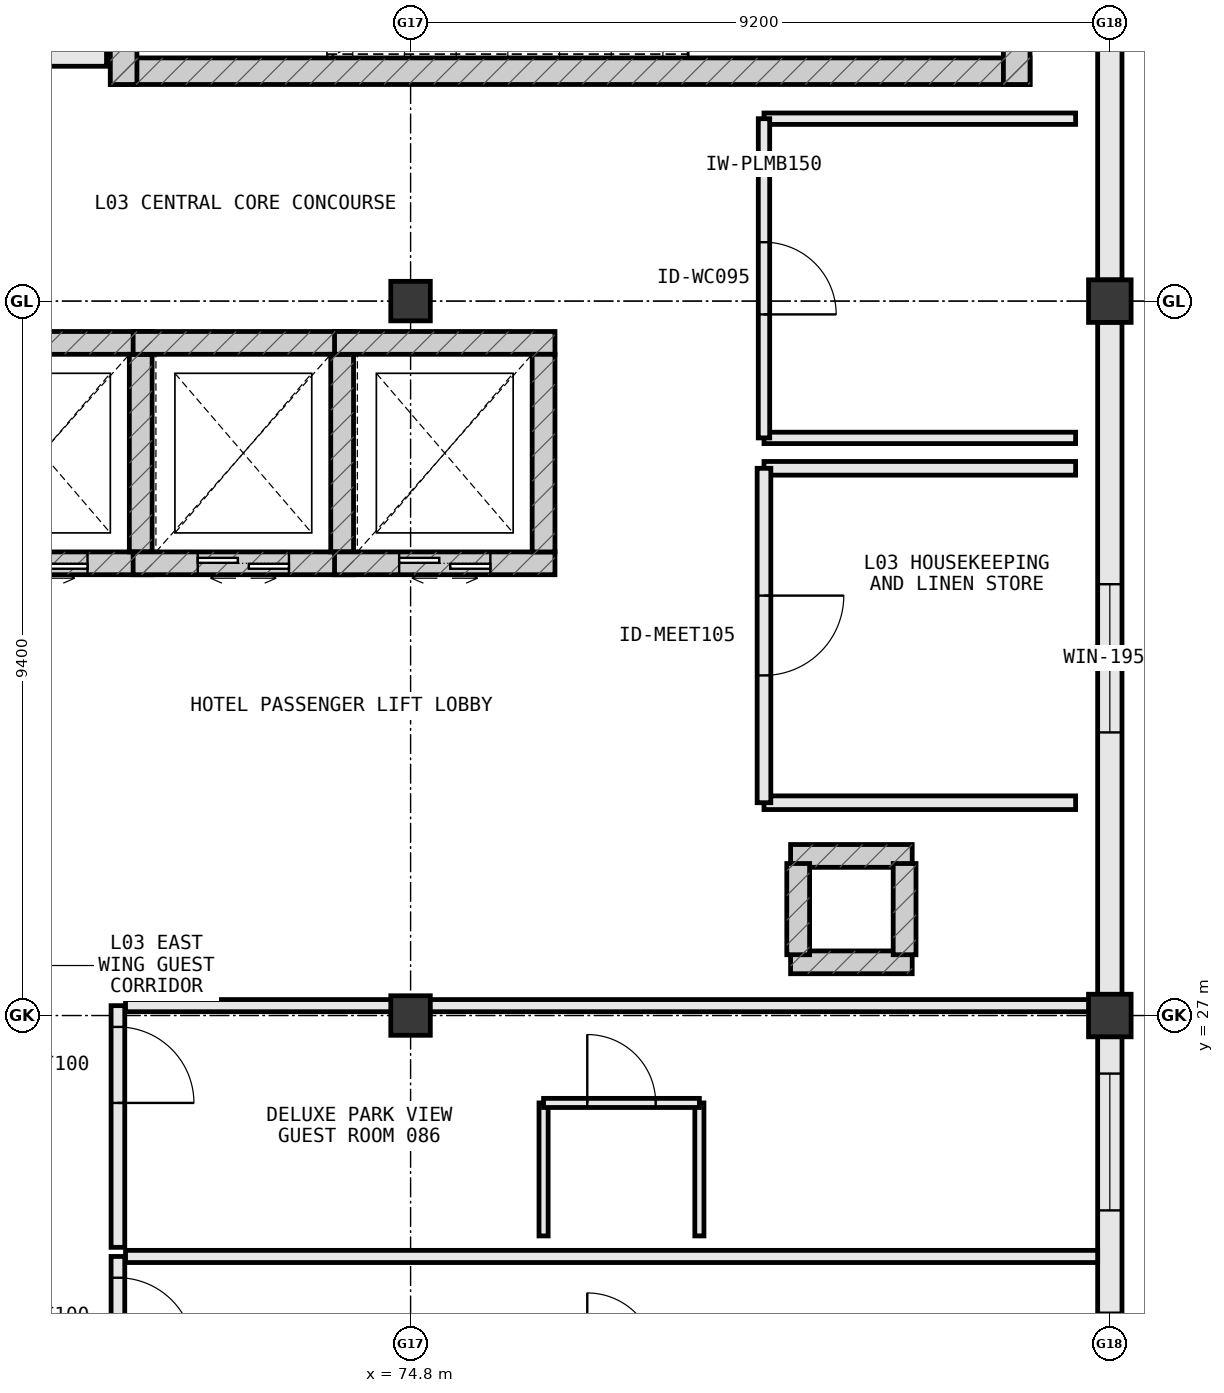
"""IFC4 building model, lengths in metres.
Left out: names, types, materials, properties, quantities, classifications, styles, units other than length and angle.
Written with IfcOpenShell. Run it as: python <this file> out.ifc"""

import sys

from ifc_helpers import new_model, si_unit, direction, frame, frame_2d, origin, origin_2d, place, context, subcontext, project, spatial, rectangle, extrude, element, fill, save


model = new_model("IFC4")
c1 = context("Model", 3, precision=1e-05, world=origin(), true_north=direction((0.0, 1.0)))
c2 = subcontext(c1, "Body", "Model", "MODEL_VIEW")
j1 = project(units=[si_unit("LENGTHUNIT", "METRE"), si_unit("PLANEANGLEUNIT", "RADIAN")], contexts=[c1])
p1 = place(None, origin())
s1 = spatial("IfcSite", under=j1, at=p1, CompositionType="ELEMENT")
p2 = place(p1, origin())
s2 = spatial("IfcBuilding", under=s1, at=p2, CompositionType="ELEMENT")
p3 = place(p2, frame((0.0, 0.0, 16.2)))
s3 = spatial("IfcBuildingStorey", under=s2, at=p3, CompositionType="ELEMENT", Elevation=16.2)
for number, where, z_axis, x_axis in (
    (1, (74.8, 27.0, 0.0), (0.0, 0.0, 1.0), (1.0, 0.0, 0.0)),
    (2, (74.8, 36.4, 0.0), (0.0, 0.0, 1.0), (1.0, 0.0, 0.0)),
):
    element("IfcColumn", number, at=place(p3, frame(where, z_axis=z_axis, x_axis=x_axis)), inside=s3, PredefinedType="COLUMN", context=c2, shape_type="SweptSolid", body=[
        extrude(rectangle(XDim=0.52, YDim=0.52, at=origin_2d()), origin(), (0.0, 0.0, 1.0), 3.8),
    ])
for number, where, z_axis, x_axis in (
    (3, (84.0, 27.0, 0.0), (0.0, 0.0, 1.0), (1.0, 0.0, 0.0)),
    (4, (84.0, 36.4, 0.0), (0.0, 0.0, 1.0), (1.0, 0.0, 0.0)),
):
    element("IfcColumn", number, at=place(p3, frame(where, z_axis=z_axis, x_axis=x_axis)), inside=s3, PredefinedType="COLUMN", context=c2, shape_type="SweptSolid", body=[
        extrude(rectangle(XDim=0.56, YDim=0.56, at=origin_2d()), origin(), (0.0, 0.0, 1.0), 3.8),
    ])
for number, where, z_axis, x_axis in (
    (5, (79.8, 27.7, 0.0), (0.0, 0.0, 1.0), (1.0, 0.0, 0.0)),
    (6, (81.4, 29.1, 0.0), (0.0, 0.0, 1.0), (-1.0, 0.0, 0.0)),
):
    element("IfcWall", number, at=place(p3, frame(where, z_axis=z_axis, x_axis=x_axis)), inside=s3, PredefinedType="SHEAR", context=c2, shape_type="SweptSolid", body=[
        extrude(rectangle(XDim=1.6, YDim=0.3, at=frame_2d((0.8, 0.0))), origin(), (0.0, 0.0, 1.0), 3.56),
    ])
for number, where, z_axis, x_axis in (
    (7, (79.9, 29.0, 0.0), (0.0, 0.0, 1.0), (0.0, -1.0, 0.0)),
    (8, (81.3, 27.8, 0.0), (0.0, 0.0, 1.0), (0.0, 1.0, 0.0)),
):
    element("IfcWall", number, at=place(p3, frame(where, z_axis=z_axis, x_axis=x_axis)), inside=s3, PredefinedType="SHEAR", context=c2, shape_type="SweptSolid", body=[
        extrude(rectangle(XDim=1.2, YDim=0.3, at=frame_2d((0.6, 0.0))), origin(), (0.0, 0.0, 1.0), 3.56),
    ])
p4 = place(p3, frame((84.0, 18.878, 0.0), z_axis=(0.0, 0.0, 1.0), x_axis=(0.0, 1.0, 0.0)))
e9 = element("IfcWall", 9, at=p4, inside=s3, PredefinedType="STANDARD", context=c2, shape_type="SweptSolid", body=[
    extrude(rectangle(XDim=7.844, YDim=0.32, at=frame_2d((3.922, 0.0))), origin(), (0.0, 0.0, 1.0), 2.975),
])
p5 = place(p4, frame((0.176, 0.0, 0.85)))
e10 = element("IfcOpeningElement", 10, at=p5, cuts=e9, PredefinedType="OPENING", context=c2, shape_type="SweptSolid", body=[
    extrude(rectangle(XDim=1.2, YDim=1.55, at=frame_2d((0.6, 0.775))), frame((0.0, 0.172, 0.0), z_axis=(0.0, -1.0, 0.0), x_axis=(1.0, 0.0, 0.0)), (0.0, 0.0, 1.0), 0.344),
])
p6 = place(p4, frame((2.412, 0.0, 0.85)))
e11 = element("IfcOpeningElement", 11, at=p6, cuts=e9, PredefinedType="OPENING", context=c2, shape_type="SweptSolid", body=[
    extrude(rectangle(XDim=1.8, YDim=1.85, at=frame_2d((0.9, 0.925))), frame((0.0, 0.172, 0.0), z_axis=(0.0, -1.0, 0.0), x_axis=(1.0, 0.0, 0.0)), (0.0, 0.0, 1.0), 0.344),
])
p7 = place(p4, frame((5.558, 0.0, 0.85)))
e12 = element("IfcOpeningElement", 12, at=p7, cuts=e9, PredefinedType="OPENING", context=c2, shape_type="SweptSolid", body=[
    extrude(rectangle(XDim=1.8, YDim=1.85, at=frame_2d((0.9, 0.925))), frame((0.0, 0.172, 0.0), z_axis=(0.0, -1.0, 0.0), x_axis=(1.0, 0.0, 0.0)), (0.0, 0.0, 1.0), 0.344),
])
p8 = place(p3, frame((84.0, 27.278, 0.0), z_axis=(0.0, 0.0, 1.0), x_axis=(0.0, 1.0, 0.0)))
e13 = element("IfcWall", 13, at=p8, inside=s3, PredefinedType="STANDARD", context=c2, shape_type="SweptSolid", body=[
    extrude(rectangle(XDim=8.844, YDim=0.32, at=frame_2d((4.422, 0.0))), origin(), (0.0, 0.0, 1.0), 2.975),
])
p9 = place(p8, frame((3.447, 0.0, 0.85)))
e14 = element("IfcOpeningElement", 14, at=p9, cuts=e13, PredefinedType="OPENING", context=c2, shape_type="SweptSolid", body=[
    extrude(rectangle(XDim=1.95, YDim=1.9, at=frame_2d((0.975, 0.95))), frame((0.0, 0.172, 0.0), z_axis=(0.0, -1.0, 0.0), x_axis=(1.0, 0.0, 0.0)), (0.0, 0.0, 1.0), 0.344),
])
p10 = place(p3, frame((84.0, 36.678, 0.0), z_axis=(0.0, 0.0, 1.0), x_axis=(0.0, 1.0, 0.0)))
e15 = element("IfcWall", 15, at=p10, inside=s3, PredefinedType="STANDARD", context=c2, shape_type="SweptSolid", body=[
    extrude(rectangle(XDim=10.244, YDim=0.32, at=frame_2d((5.122, 0.0))), origin(), (0.0, 0.0, 1.0), 2.975),
])
p11 = place(p10, frame((6.708, 0.0, 0.85)))
e16 = element("IfcOpeningElement", 16, at=p11, cuts=e15, PredefinedType="OPENING", context=c2, shape_type="SweptSolid", body=[
    extrude(rectangle(XDim=1.95, YDim=1.9, at=frame_2d((0.975, 0.95))), frame((0.0, 0.172, 0.0), z_axis=(0.0, -1.0, 0.0), x_axis=(1.0, 0.0, 0.0)), (0.0, 0.0, 1.0), 0.344),
])
p12 = place(p3, frame((70.85, 39.425, 0.0), z_axis=(0.0, 0.0, 1.0), x_axis=(1.0, 0.0, 0.0)))
e17 = element("IfcWall", 17, at=p12, inside=s3, PredefinedType="SHEAR", context=c2, shape_type="SweptSolid", body=[
    extrude(rectangle(XDim=12.1, YDim=0.35, at=frame_2d((6.05, 0.0))), origin(), (0.0, 0.0, 1.0), 3.8),
])
p13 = place(p3, frame((82.775, 39.25, 0.0), z_axis=(0.0, 0.0, 1.0), x_axis=(0.0, 1.0, 0.0)))
e18 = element("IfcWall", 18, at=p13, inside=s3, PredefinedType="SHEAR", context=c2, shape_type="SweptSolid", body=[
    extrude(rectangle(XDim=5.1, YDim=0.35, at=frame_2d((2.55, 0.0))), origin(), (0.0, 0.0, 1.0), 3.8),
])
p14 = place(p3, frame((71.025, 44.35, 0.0), z_axis=(0.0, 0.0, 1.0), x_axis=(0.0, -1.0, 0.0)))
e19 = element("IfcWall", 19, at=p14, inside=s3, PredefinedType="SHEAR", context=c2, shape_type="SweptSolid", body=[
    extrude(rectangle(XDim=5.1, YDim=0.35, at=frame_2d((2.55, 0.0))), origin(), (0.0, 0.0, 1.0), 3.8),
])
p15 = place(p14, frame((2.0, 0.0, 0.0)))
e20 = element("IfcOpeningElement", 20, at=p15, cuts=e19, PredefinedType="OPENING", context=c2, shape_type="SweptSolid", body=[
    extrude(rectangle(XDim=1.1, YDim=2.2, at=frame_2d((0.55, 1.1))), frame((0.0, 0.187, 0.0), z_axis=(0.0, -1.0, 0.0), x_axis=(1.0, 0.0, 0.0)), (0.0, 0.0, 1.0), 0.374),
])
p16 = place(p3, frame((68.5, 32.95, 0.0), z_axis=(0.0, 0.0, 1.0), x_axis=(1.0, 0.0, 0.0)))
e21 = element("IfcWall", 21, at=p16, inside=s3, PredefinedType="SHEAR", context=c2, shape_type="SweptSolid", body=[
    extrude(rectangle(XDim=2.9, YDim=0.3, at=frame_2d((1.45, 0.0))), origin(), (0.0, 0.0, 1.0), 3.8),
])
p17 = place(p16, frame((0.85, 0.0, 0.0)))
e22 = element("IfcOpeningElement", 22, at=p17, cuts=e21, PredefinedType="OPENING", context=c2, shape_type="SweptSolid", body=[
    extrude(rectangle(XDim=1.2, YDim=2.2, at=frame_2d((0.6, 1.1))), frame((0.0, 0.162, 0.0), z_axis=(0.0, -1.0, 0.0), x_axis=(1.0, 0.0, 0.0)), (0.0, 0.0, 1.0), 0.324),
])
p18 = place(p3, frame((71.4, 35.85, 0.0), z_axis=(0.0, 0.0, 1.0), x_axis=(-1.0, 0.0, 0.0)))
e23 = element("IfcWall", 23, at=p18, inside=s3, PredefinedType="SHEAR", context=c2, shape_type="SweptSolid", body=[
    extrude(rectangle(XDim=2.9, YDim=0.3, at=frame_2d((1.45, 0.0))), origin(), (0.0, 0.0, 1.0), 3.8),
])
p19 = place(p3, frame((71.25, 33.1, 0.0), z_axis=(0.0, 0.0, 1.0), x_axis=(0.0, 1.0, 0.0)))
e24 = element("IfcWall", 24, at=p19, inside=s3, PredefinedType="SHEAR", context=c2, shape_type="SweptSolid", body=[
    extrude(rectangle(XDim=2.6, YDim=0.3, at=frame_2d((1.3, 0.0))), origin(), (0.0, 0.0, 1.0), 3.8),
])
p20 = place(p3, frame((71.15, 32.95, 0.0), z_axis=(0.0, 0.0, 1.0), x_axis=(1.0, 0.0, 0.0)))
e25 = element("IfcWall", 25, at=p20, inside=s3, PredefinedType="SHEAR", context=c2, shape_type="SweptSolid", body=[
    extrude(rectangle(XDim=2.9, YDim=0.3, at=frame_2d((1.45, 0.0))), origin(), (0.0, 0.0, 1.0), 3.8),
])
p21 = place(p20, frame((0.85, 0.0, 0.0)))
e26 = element("IfcOpeningElement", 26, at=p21, cuts=e25, PredefinedType="OPENING", context=c2, shape_type="SweptSolid", body=[
    extrude(rectangle(XDim=1.2, YDim=2.2, at=frame_2d((0.6, 1.1))), frame((0.0, 0.162, 0.0), z_axis=(0.0, -1.0, 0.0), x_axis=(1.0, 0.0, 0.0)), (0.0, 0.0, 1.0), 0.324),
])
p22 = place(p3, frame((74.05, 35.85, 0.0), z_axis=(0.0, 0.0, 1.0), x_axis=(-1.0, 0.0, 0.0)))
e27 = element("IfcWall", 27, at=p22, inside=s3, PredefinedType="SHEAR", context=c2, shape_type="SweptSolid", body=[
    extrude(rectangle(XDim=2.9, YDim=0.3, at=frame_2d((1.45, 0.0))), origin(), (0.0, 0.0, 1.0), 3.8),
])
p23 = place(p3, frame((73.9, 33.1, 0.0), z_axis=(0.0, 0.0, 1.0), x_axis=(0.0, 1.0, 0.0)))
e28 = element("IfcWall", 28, at=p23, inside=s3, PredefinedType="SHEAR", context=c2, shape_type="SweptSolid", body=[
    extrude(rectangle(XDim=2.6, YDim=0.3, at=frame_2d((1.3, 0.0))), origin(), (0.0, 0.0, 1.0), 3.8),
])
p24 = place(p3, frame((73.8, 32.95, 0.0), z_axis=(0.0, 0.0, 1.0), x_axis=(1.0, 0.0, 0.0)))
e29 = element("IfcWall", 29, at=p24, inside=s3, PredefinedType="SHEAR", context=c2, shape_type="SweptSolid", body=[
    extrude(rectangle(XDim=2.9, YDim=0.3, at=frame_2d((1.45, 0.0))), origin(), (0.0, 0.0, 1.0), 3.8),
])
p25 = place(p24, frame((0.85, 0.0, 0.0)))
e30 = element("IfcOpeningElement", 30, at=p25, cuts=e29, PredefinedType="OPENING", context=c2, shape_type="SweptSolid", body=[
    extrude(rectangle(XDim=1.2, YDim=2.2, at=frame_2d((0.6, 1.1))), frame((0.0, 0.162, 0.0), z_axis=(0.0, -1.0, 0.0), x_axis=(1.0, 0.0, 0.0)), (0.0, 0.0, 1.0), 0.324),
])
p26 = place(p3, frame((76.7, 35.85, 0.0), z_axis=(0.0, 0.0, 1.0), x_axis=(-1.0, 0.0, 0.0)))
e31 = element("IfcWall", 31, at=p26, inside=s3, PredefinedType="SHEAR", context=c2, shape_type="SweptSolid", body=[
    extrude(rectangle(XDim=2.9, YDim=0.3, at=frame_2d((1.45, 0.0))), origin(), (0.0, 0.0, 1.0), 3.8),
])
p27 = place(p3, frame((76.55, 33.1, 0.0), z_axis=(0.0, 0.0, 1.0), x_axis=(0.0, 1.0, 0.0)))
e32 = element("IfcWall", 32, at=p27, inside=s3, PredefinedType="SHEAR", context=c2, shape_type="SweptSolid", body=[
    extrude(rectangle(XDim=2.6, YDim=0.3, at=frame_2d((1.3, 0.0))), origin(), (0.0, 0.0, 1.0), 3.8),
])
p28 = place(p3, frame((65.4, 39.6, 0.0), z_axis=(0.0, 0.0, 1.0), x_axis=(1.0, 0.0, 0.0)))
e33 = element("IfcWall", 33, at=p28, inside=s3, PredefinedType="STANDARD", context=c2, shape_type="SweptSolid", body=[
    extrude(rectangle(XDim=5.4, YDim=0.22, at=frame_2d((2.7, 0.0))), origin(), (0.0, 0.0, 1.0), 3.56),
])
p29 = place(p28, frame((1.95, 0.0, 0.0)))
e34 = element("IfcOpeningElement", 34, at=p29, cuts=e33, PredefinedType="OPENING", context=c2, shape_type="SweptSolid", body=[
    extrude(rectangle(XDim=1.5, YDim=2.2, at=frame_2d((0.75, 1.1))), frame((0.0, 0.122, 0.0), z_axis=(0.0, -1.0, 0.0), x_axis=(1.0, 0.0, 0.0)), (0.0, 0.0, 1.0), 0.244),
])
for number, where, z_axis, x_axis in (
    (35, (79.45, 29.8, 0.0), (0.0, 0.0, 1.0), (1.0, 0.0, 0.0)),
    (36, (83.55, 34.2, 0.0), (0.0, 0.0, 1.0), (-1.0, 0.0, 0.0)),
):
    element("IfcWall", number, at=place(p3, frame(where, z_axis=z_axis, x_axis=x_axis)), inside=s3, PredefinedType="PARTITIONING", context=c2, shape_type="SweptSolid", body=[
        extrude(rectangle(XDim=4.1, YDim=0.18, at=frame_2d((2.05, 0.0))), origin(), (0.0, 0.0, 1.0), 3.56),
    ])
p30 = place(p3, frame((79.45, 34.2, 0.0), z_axis=(0.0, 0.0, 1.0), x_axis=(0.0, -1.0, 0.0)))
e37 = element("IfcWall", 37, at=p30, inside=s3, PredefinedType="PARTITIONING", context=c2, shape_type="SweptSolid", body=[
    extrude(rectangle(XDim=4.4, YDim=0.18, at=frame_2d((2.2, 0.0))), origin(), (0.0, 0.0, 1.0), 3.56),
])
p31 = place(p30, frame((1.675, 0.0, 0.0)))
e38 = element("IfcOpeningElement", 38, at=p31, cuts=e37, PredefinedType="OPENING", context=c2, shape_type="SweptSolid", body=[
    extrude(rectangle(XDim=1.05, YDim=2.2, at=frame_2d((0.525, 1.1))), frame((0.0, 0.102, 0.0), z_axis=(0.0, -1.0, 0.0), x_axis=(1.0, 0.0, 0.0)), (0.0, 0.0, 1.0), 0.204),
])
for number, where, z_axis, x_axis in (
    (39, (79.45, 34.6, 0.0), (0.0, 0.0, 1.0), (1.0, 0.0, 0.0)),
    (40, (83.55, 38.8, 0.0), (0.0, 0.0, 1.0), (-1.0, 0.0, 0.0)),
):
    element("IfcWall", number, at=place(p3, frame(where, z_axis=z_axis, x_axis=x_axis)), inside=s3, PredefinedType="PLUMBINGWALL", context=c2, shape_type="SweptSolid", body=[
        extrude(rectangle(XDim=4.1, YDim=0.15, at=frame_2d((2.05, 0.0))), origin(), (0.0, 0.0, 1.0), 3.56),
    ])
p32 = place(p3, frame((79.45, 38.8, 0.0), z_axis=(0.0, 0.0, 1.0), x_axis=(0.0, -1.0, 0.0)))
e41 = element("IfcWall", 41, at=p32, inside=s3, PredefinedType="PLUMBINGWALL", context=c2, shape_type="SweptSolid", body=[
    extrude(rectangle(XDim=4.2, YDim=0.15, at=frame_2d((2.1, 0.0))), origin(), (0.0, 0.0, 1.0), 3.56),
])
p33 = place(p32, frame((1.625, 0.0, 0.0)))
e42 = element("IfcOpeningElement", 42, at=p33, cuts=e41, PredefinedType="OPENING", context=c2, shape_type="SweptSolid", body=[
    extrude(rectangle(XDim=0.95, YDim=2.15, at=frame_2d((0.475, 1.075))), frame((0.0, 0.087, 0.0), z_axis=(0.0, -1.0, 0.0), x_axis=(1.0, 0.0, 0.0)), (0.0, 0.0, 1.0), 0.174),
])
p34 = place(p3, frame((70.95, 23.83, 0.0), z_axis=(0.0, 0.0, 1.0), x_axis=(0.0, -1.0, 0.0)))
e43 = element("IfcWall", 43, at=p34, inside=s3, PredefinedType="PARTITIONING", context=c2, shape_type="SweptSolid", body=[
    extrude(rectangle(XDim=3.28, YDim=0.18, at=frame_2d((1.64, 0.0))), origin(), (0.0, 0.0, 1.0), 3.56),
])
p35 = place(p34, frame((0.28, 0.0, 0.0)))
e44 = element("IfcOpeningElement", 44, at=p35, cuts=e43, PredefinedType="OPENING", context=c2, shape_type="SweptSolid", body=[
    extrude(rectangle(XDim=1.0, YDim=2.2, at=frame_2d((0.5, 1.1))), frame((0.0, 0.102, 0.0), z_axis=(0.0, -1.0, 0.0), x_axis=(1.0, 0.0, 0.0)), (0.0, 0.0, 1.0), 0.204),
])
p36 = place(p3, frame((71.05, 23.83, 0.0), z_axis=(0.0, 0.0, 1.0), x_axis=(1.0, 0.0, 0.0)))
e45 = element("IfcWall", 45, at=p36, inside=s3, PredefinedType="PARTITIONING", context=c2, shape_type="SweptSolid", body=[
    extrude(rectangle(XDim=12.79, YDim=0.16, at=frame_2d((6.395, 0.0))), origin(), (0.0, 0.0, 1.0), 3.56),
])
p37 = place(p3, frame((70.95, 27.13, 0.0), z_axis=(0.0, 0.0, 1.0), x_axis=(0.0, -1.0, 0.0)))
e46 = element("IfcWall", 46, at=p37, inside=s3, PredefinedType="PARTITIONING", context=c2, shape_type="SweptSolid", body=[
    extrude(rectangle(XDim=3.18, YDim=0.18, at=frame_2d((1.59, 0.0))), origin(), (0.0, 0.0, 1.0), 3.56),
])
p38 = place(p37, frame((0.28, 0.0, 0.0)))
e47 = element("IfcOpeningElement", 47, at=p38, cuts=e46, PredefinedType="OPENING", context=c2, shape_type="SweptSolid", body=[
    extrude(rectangle(XDim=1.0, YDim=2.2, at=frame_2d((0.5, 1.1))), frame((0.0, 0.102, 0.0), z_axis=(0.0, -1.0, 0.0), x_axis=(1.0, 0.0, 0.0)), (0.0, 0.0, 1.0), 0.204),
])
p39 = place(p3, frame((71.05, 27.13, 0.0), z_axis=(0.0, 0.0, 1.0), x_axis=(1.0, 0.0, 0.0)))
e48 = element("IfcWall", 48, at=p39, inside=s3, PredefinedType="PARTITIONING", context=c2, shape_type="SweptSolid", body=[
    extrude(rectangle(XDim=12.79, YDim=0.16, at=frame_2d((6.395, 0.0))), origin(), (0.0, 0.0, 1.0), 2.915),
])
for number, where, z_axis, x_axis in (
    (49, (76.55, 24.1, 0.0), (0.0, 0.0, 1.0), (0.0, 1.0, 0.0)),
    (50, (78.6, 24.1, 0.0), (0.0, 0.0, 1.0), (0.0, 1.0, 0.0)),
):
    element("IfcWall", number, at=place(p3, frame(where, z_axis=z_axis, x_axis=x_axis)), inside=s3, PredefinedType="PARTITIONING", context=c2, shape_type="SweptSolid", body=[
        extrude(rectangle(XDim=1.75, YDim=0.12, at=frame_2d((0.875, 0.0))), origin(), (0.0, 0.0, 1.0), 3.56),
    ])
p40 = place(p3, frame((76.55, 25.85, 0.0), z_axis=(0.0, 0.0, 1.0), x_axis=(1.0, 0.0, 0.0)))
e51 = element("IfcWall", 51, at=p40, inside=s3, PredefinedType="PARTITIONING", context=c2, shape_type="SweptSolid", body=[
    extrude(rectangle(XDim=2.05, YDim=0.12, at=frame_2d((1.025, 0.0))), origin(), (0.0, 0.0, 1.0), 3.56),
])
p41 = place(p40, frame((0.575, 0.0, 0.0)))
e52 = element("IfcOpeningElement", 52, at=p41, cuts=e51, PredefinedType="OPENING", context=c2, shape_type="SweptSolid", body=[
    extrude(rectangle(XDim=0.9, YDim=2.15, at=frame_2d((0.45, 1.075))), frame((0.0, 0.072, 0.0), z_axis=(0.0, -1.0, 0.0), x_axis=(1.0, 0.0, 0.0)), (0.0, 0.0, 1.0), 0.144),
])
p42 = place(p9, origin())
e53 = element("IfcWindow", 53, at=p42, inside=s3, PartitioningType="DOUBLE_PANEL_VERTICAL", PredefinedType="WINDOW", context=c2, shape_type="SweptSolid", body=[
    extrude(rectangle(XDim=1.95, YDim=1.9, at=frame_2d((0.975, 0.95))), frame((0.0, 0.03, 0.0), z_axis=(0.0, -1.0, 0.0), x_axis=(1.0, 0.0, 0.0)), (0.0, 0.0, 1.0), 0.06),
])
fill(e14, e53)
p43 = place(p7, origin())
e54 = element("IfcWindow", 54, at=p43, inside=s3, PartitioningType="SINGLE_PANEL", PredefinedType="WINDOW", context=c2, shape_type="SweptSolid", body=[
    extrude(rectangle(XDim=1.8, YDim=1.85, at=frame_2d((0.9, 0.925))), frame((0.0, 0.03, 0.0), z_axis=(0.0, -1.0, 0.0), x_axis=(1.0, 0.0, 0.0)), (0.0, 0.0, 1.0), 0.06),
])
fill(e12, e54)
p44 = place(p17, origin())
e55 = element("IfcDoor", 55, at=p44, inside=s3, OperationType="DOUBLE_DOOR_SLIDING", PredefinedType="DOOR", context=c2, shape_type="SweptSolid", body=[
    extrude(rectangle(XDim=1.2, YDim=2.2, at=frame_2d((0.6, 1.1))), frame((0.0, 0.025, 0.0), z_axis=(0.0, -1.0, 0.0), x_axis=(1.0, 0.0, 0.0)), (0.0, 0.0, 1.0), 0.05),
])
fill(e22, e55)
p45 = place(p21, origin())
e56 = element("IfcDoor", 56, at=p45, inside=s3, OperationType="DOUBLE_DOOR_SLIDING", PredefinedType="DOOR", context=c2, shape_type="SweptSolid", body=[
    extrude(rectangle(XDim=1.2, YDim=2.2, at=frame_2d((0.6, 1.1))), frame((0.0, 0.025, 0.0), z_axis=(0.0, -1.0, 0.0), x_axis=(1.0, 0.0, 0.0)), (0.0, 0.0, 1.0), 0.05),
])
fill(e26, e56)
p46 = place(p25, origin())
e57 = element("IfcDoor", 57, at=p46, inside=s3, OperationType="DOUBLE_DOOR_SLIDING", PredefinedType="DOOR", context=c2, shape_type="SweptSolid", body=[
    extrude(rectangle(XDim=1.2, YDim=2.2, at=frame_2d((0.6, 1.1))), frame((0.0, 0.025, 0.0), z_axis=(0.0, -1.0, 0.0), x_axis=(1.0, 0.0, 0.0)), (0.0, 0.0, 1.0), 0.05),
])
fill(e30, e57)
p47 = place(p31, origin())
e58 = element("IfcDoor", 58, at=p47, inside=s3, OperationType="SINGLE_SWING_LEFT", PredefinedType="DOOR", context=c2, shape_type="SweptSolid", body=[
    extrude(rectangle(XDim=1.05, YDim=2.2, at=frame_2d((0.525, 1.1))), frame((0.0, 0.025, 0.0), z_axis=(0.0, -1.0, 0.0), x_axis=(1.0, 0.0, 0.0)), (0.0, 0.0, 1.0), 0.05),
])
fill(e38, e58)
p48 = place(p33, origin())
e59 = element("IfcDoor", 59, at=p48, inside=s3, OperationType="SINGLE_SWING_RIGHT", PredefinedType="DOOR", context=c2, shape_type="SweptSolid", body=[
    extrude(rectangle(XDim=0.95, YDim=2.15, at=frame_2d((0.475, 1.075))), frame((0.0, 0.025, 0.0), z_axis=(0.0, -1.0, 0.0), x_axis=(1.0, 0.0, 0.0)), (0.0, 0.0, 1.0), 0.05),
])
fill(e42, e59)
p49 = place(p35, origin())
e60 = element("IfcDoor", 60, at=p49, inside=s3, OperationType="SINGLE_SWING_RIGHT", PredefinedType="DOOR", context=c2, shape_type="SweptSolid", body=[
    extrude(rectangle(XDim=1.0, YDim=2.2, at=frame_2d((0.5, 1.1))), frame((0.0, 0.025, 0.0), z_axis=(0.0, -1.0, 0.0), x_axis=(1.0, 0.0, 0.0)), (0.0, 0.0, 1.0), 0.05),
])
fill(e44, e60)
p50 = place(p38, origin())
e61 = element("IfcDoor", 61, at=p50, inside=s3, OperationType="SINGLE_SWING_RIGHT", PredefinedType="DOOR", context=c2, shape_type="SweptSolid", body=[
    extrude(rectangle(XDim=1.0, YDim=2.2, at=frame_2d((0.5, 1.1))), frame((0.0, 0.025, 0.0), z_axis=(0.0, -1.0, 0.0), x_axis=(1.0, 0.0, 0.0)), (0.0, 0.0, 1.0), 0.05),
])
fill(e47, e61)
p51 = place(p41, origin())
e62 = element("IfcDoor", 62, at=p51, inside=s3, OperationType="SINGLE_SWING_LEFT", PredefinedType="DOOR", context=c2, shape_type="SweptSolid", body=[
    extrude(rectangle(XDim=0.9, YDim=2.15, at=frame_2d((0.45, 1.075))), frame((0.0, 0.025, 0.0), z_axis=(0.0, -1.0, 0.0), x_axis=(1.0, 0.0, 0.0)), (0.0, 0.0, 1.0), 0.05),
])
fill(e52, e62)
save(model, sys.argv[1])
